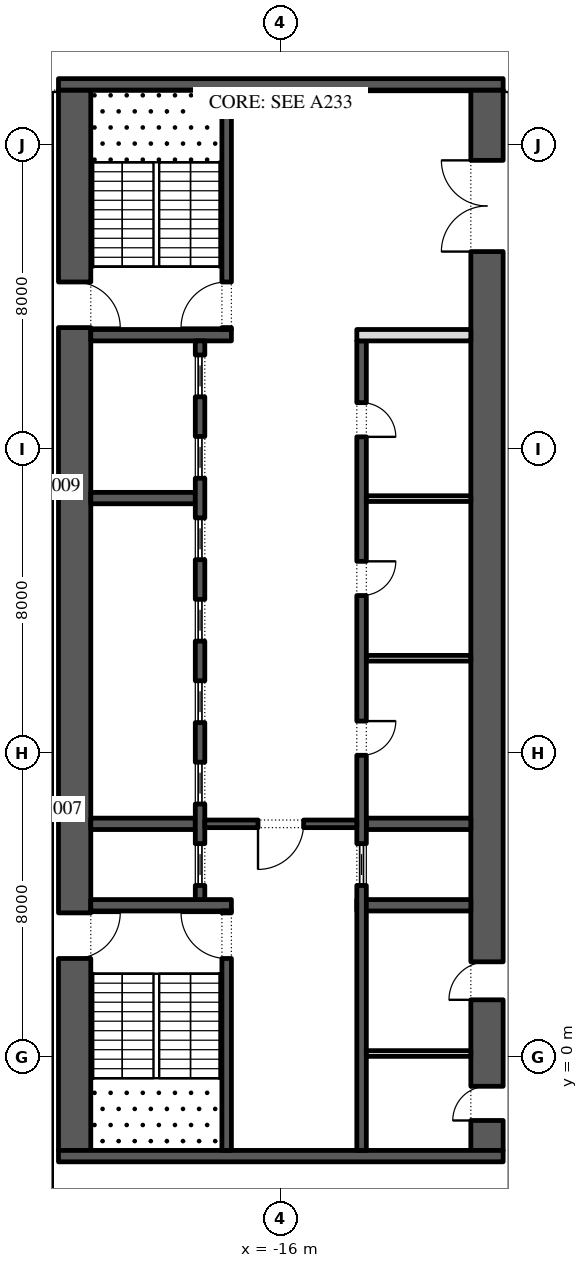
"""IFC4 building model, lengths in metres.
Left out: names, types, materials, properties, quantities, classifications, styles, units other than length and angle.
Written with IfcOpenShell. Run it as: python <this file> out.ifc"""

import sys

from ifc_helpers import new_model, si_unit, direction, frame, frame_2d, origin, place, context, subcontext, project, spatial, rectangle, extrude, element, fill, save


model = new_model("IFC4")
c1 = context("Model", 3, precision=1e-05, world=origin(), true_north=direction((0.0, 1.0)))
c2 = subcontext(c1, "Body", "Model", "MODEL_VIEW")
j1 = project(units=[si_unit("LENGTHUNIT", "METRE"), si_unit("PLANEANGLEUNIT", "RADIAN")], contexts=[c1])
p1 = place(None, origin())
s1 = spatial("IfcSite", under=j1, at=p1, CompositionType="ELEMENT")
p2 = place(p1, origin())
s2 = spatial("IfcBuilding", under=s1, at=p2, CompositionType="ELEMENT")
p3 = place(p2, frame((0.0, 0.0, 139.2)))
s3 = spatial("IfcBuildingStorey", under=s2, at=p3, CompositionType="ELEMENT", Elevation=139.2)
p4 = place(p3, frame((-21.425, -2.45, 0.0), z_axis=(0.0, 0.0, 1.0), x_axis=(0.0, 1.0, 0.0)))
e1 = element("IfcWall", 1, at=p4, inside=s3, PredefinedType="SHEAR", context=c2, shape_type="SweptSolid", body=[
    extrude(rectangle(XDim=27.9, YDim=0.85, at=frame_2d((13.95, 0.0))), origin(), (0.0, 0.0, 1.0), 4.0),
])
p5 = place(p4, frame((5.05, 0.0, 0.0)))
e2 = element("IfcOpeningElement", 2, at=p5, cuts=e1, PredefinedType="OPENING", context=c2, shape_type="SweptSolid", body=[
    extrude(rectangle(XDim=1.2, YDim=2.1, at=frame_2d((0.6, 1.05))), frame((0.0, 0.435, 0.0), z_axis=(0.0, -1.0, 0.0), x_axis=(1.0, 0.0, 0.0)), (0.0, 0.0, 1.0), 0.87),
])
p6 = place(p4, frame((21.65, 0.0, 0.0)))
e3 = element("IfcOpeningElement", 3, at=p6, cuts=e1, PredefinedType="OPENING", context=c2, shape_type="SweptSolid", body=[
    extrude(rectangle(XDim=1.2, YDim=2.1, at=frame_2d((0.6, 1.05))), frame((0.0, 0.435, 0.0), z_axis=(0.0, -1.0, 0.0), x_axis=(1.0, 0.0, 0.0)), (0.0, 0.0, 1.0), 0.87),
])
p7 = place(p3, frame((-10.575, -2.45, 0.0), z_axis=(0.0, 0.0, 1.0), x_axis=(0.0, 1.0, 0.0)))
e4 = element("IfcWall", 4, at=p7, inside=s3, PredefinedType="SHEAR", context=c2, shape_type="SweptSolid", body=[
    extrude(rectangle(XDim=27.9, YDim=0.85, at=frame_2d((13.95, 0.0))), origin(), (0.0, 0.0, 1.0), 4.0),
])
p8 = place(p7, frame((23.65, 0.0, 0.0)))
e5 = element("IfcOpeningElement", 5, at=p8, cuts=e4, PredefinedType="OPENING", context=c2, shape_type="SweptSolid", body=[
    extrude(rectangle(XDim=2.4, YDim=2.1, at=frame_2d((1.2, 1.05))), frame((0.0, 0.435, 0.0), z_axis=(0.0, -1.0, 0.0), x_axis=(1.0, 0.0, 0.0)), (0.0, 0.0, 1.0), 0.87),
])
p9 = place(p7, frame((0.788, 0.0, 0.0)))
e6 = element("IfcOpeningElement", 6, at=p9, cuts=e4, PredefinedType="OPENING", context=c2, shape_type="SweptSolid", body=[
    extrude(rectangle(XDim=0.9, YDim=2.1, at=frame_2d((0.45, 1.05))), frame((0.0, 0.435, 0.0), z_axis=(0.0, -1.0, 0.0), x_axis=(1.0, 0.0, 0.0)), (0.0, 0.0, 1.0), 0.87),
])
p10 = place(p7, frame((3.962, 0.0, 0.0)))
e7 = element("IfcOpeningElement", 7, at=p10, cuts=e4, PredefinedType="OPENING", context=c2, shape_type="SweptSolid", body=[
    extrude(rectangle(XDim=1.0, YDim=2.1, at=frame_2d((0.5, 1.05))), frame((0.0, 0.435, 0.0), z_axis=(0.0, -1.0, 0.0), x_axis=(1.0, 0.0, 0.0)), (0.0, 0.0, 1.0), 0.87),
])
for number, where, z_axis, x_axis in (
    (8, (-21.85, -2.6, 0.0), (0.0, 0.0, 1.0), (1.0, 0.0, 0.0)),
    (9, (-21.85, 25.6, 0.0), (0.0, 0.0, 1.0), (1.0, 0.0, 0.0)),
):
    element("IfcWall", number, at=place(p3, frame(where, z_axis=z_axis, x_axis=x_axis)), inside=s3, PredefinedType="SHEAR", context=c2, shape_type="SweptSolid", body=[
        extrude(rectangle(XDim=11.7, YDim=0.3, at=frame_2d((5.85, 0.0))), origin(), (0.0, 0.0, 1.0), 4.0),
    ])
p11 = place(p3, frame((-21.0, 4.0, 0.0), z_axis=(0.0, 0.0, 1.0), x_axis=(1.0, 0.0, 0.0)))
e10 = element("IfcWall", 10, at=p11, inside=s3, PredefinedType="SHEAR", context=c2, shape_type="SweptSolid", body=[
    extrude(rectangle(XDim=3.7, YDim=0.3, at=frame_2d((1.85, 0.0))), origin(), (0.0, 0.0, 1.0), 4.0),
])
p12 = place(p3, frame((-17.425, -2.45, 0.0), z_axis=(0.0, 0.0, 1.0), x_axis=(0.0, 1.0, 0.0)))
e11 = element("IfcWall", 11, at=p12, inside=s3, PredefinedType="SHEAR", context=c2, shape_type="SweptSolid", body=[
    extrude(rectangle(XDim=6.3, YDim=0.25, at=frame_2d((3.15, 0.0))), origin(), (0.0, 0.0, 1.0), 4.0),
])
p13 = place(p12, frame((5.05, 0.0, 0.0)))
e12 = element("IfcOpeningElement", 12, at=p13, cuts=e11, PredefinedType="OPENING", context=c2, shape_type="SweptSolid", body=[
    extrude(rectangle(XDim=1.2, YDim=2.1, at=frame_2d((0.6, 1.05))), frame((0.0, 0.135, 0.0), z_axis=(0.0, -1.0, 0.0), x_axis=(1.0, 0.0, 0.0)), (0.0, 0.0, 1.0), 0.27),
])
p14 = place(p3, frame((-21.0, 19.0, 0.0), z_axis=(0.0, 0.0, 1.0), x_axis=(1.0, 0.0, 0.0)))
e13 = element("IfcWall", 13, at=p14, inside=s3, PredefinedType="SHEAR", context=c2, shape_type="SweptSolid", body=[
    extrude(rectangle(XDim=3.7, YDim=0.3, at=frame_2d((1.85, 0.0))), origin(), (0.0, 0.0, 1.0), 4.0),
])
p15 = place(p3, frame((-17.425, 19.15, 0.0), z_axis=(0.0, 0.0, 1.0), x_axis=(0.0, 1.0, 0.0)))
e14 = element("IfcWall", 14, at=p15, inside=s3, PredefinedType="SHEAR", context=c2, shape_type="SweptSolid", body=[
    extrude(rectangle(XDim=6.3, YDim=0.25, at=frame_2d((3.15, 0.0))), origin(), (0.0, 0.0, 1.0), 4.0),
])
p16 = place(p15, frame((0.05, 0.0, 0.0)))
e15 = element("IfcOpeningElement", 15, at=p16, cuts=e14, PredefinedType="OPENING", context=c2, shape_type="SweptSolid", body=[
    extrude(rectangle(XDim=1.2, YDim=2.1, at=frame_2d((0.6, 1.05))), frame((0.0, 0.135, 0.0), z_axis=(0.0, -1.0, 0.0), x_axis=(1.0, 0.0, 0.0)), (0.0, 0.0, 1.0), 0.27),
])
for number, where, z_axis, x_axis in (
    (16, (-21.0, 6.143, 0.0), (0.0, 0.0, 1.0), (1.0, 0.0, 0.0)),
    (17, (-21.0, 14.714, 0.0), (0.0, 0.0, 1.0), (1.0, 0.0, 0.0)),
):
    element("IfcWall", number, at=place(p3, frame(where, z_axis=z_axis, x_axis=x_axis)), inside=s3, PredefinedType="SHEAR", context=c2, shape_type="SweptSolid", body=[
        extrude(rectangle(XDim=2.75, YDim=0.3, at=frame_2d((1.375, 0.0))), origin(), (0.0, 0.0, 1.0), 4.0),
    ])
p17 = place(p3, frame((-18.125, 4.15, 0.0), z_axis=(0.0, 0.0, 1.0), x_axis=(0.0, 1.0, 0.0)))
e18 = element("IfcWall", 18, at=p17, inside=s3, PredefinedType="SHEAR", context=c2, shape_type="SweptSolid", body=[
    extrude(rectangle(XDim=14.7, YDim=0.25, at=frame_2d((7.35, 0.0))), origin(), (0.0, 0.0, 1.0), 4.0),
])
p18 = place(p17, frame((0.371, 0.0, 0.0)))
e19 = element("IfcOpeningElement", 19, at=p18, cuts=e18, PredefinedType="OPENING", context=c2, shape_type="SweptSolid", body=[
    extrude(rectangle(XDim=1.1, YDim=2.1, at=frame_2d((0.55, 1.05))), frame((0.0, 0.135, 0.0), z_axis=(0.0, -1.0, 0.0), x_axis=(1.0, 0.0, 0.0)), (0.0, 0.0, 1.0), 0.27),
])
p19 = place(p17, frame((2.514, 0.0, 0.0)))
e20 = element("IfcOpeningElement", 20, at=p19, cuts=e18, PredefinedType="OPENING", context=c2, shape_type="SweptSolid", body=[
    extrude(rectangle(XDim=1.1, YDim=2.1, at=frame_2d((0.55, 1.05))), frame((0.0, 0.135, 0.0), z_axis=(0.0, -1.0, 0.0), x_axis=(1.0, 0.0, 0.0)), (0.0, 0.0, 1.0), 0.27),
])
p20 = place(p17, frame((4.657, 0.0, 0.0)))
e21 = element("IfcOpeningElement", 21, at=p20, cuts=e18, PredefinedType="OPENING", context=c2, shape_type="SweptSolid", body=[
    extrude(rectangle(XDim=1.1, YDim=2.1, at=frame_2d((0.55, 1.05))), frame((0.0, 0.135, 0.0), z_axis=(0.0, -1.0, 0.0), x_axis=(1.0, 0.0, 0.0)), (0.0, 0.0, 1.0), 0.27),
])
p21 = place(p17, frame((6.8, 0.0, 0.0)))
e22 = element("IfcOpeningElement", 22, at=p21, cuts=e18, PredefinedType="OPENING", context=c2, shape_type="SweptSolid", body=[
    extrude(rectangle(XDim=1.1, YDim=2.1, at=frame_2d((0.55, 1.05))), frame((0.0, 0.135, 0.0), z_axis=(0.0, -1.0, 0.0), x_axis=(1.0, 0.0, 0.0)), (0.0, 0.0, 1.0), 0.27),
])
p22 = place(p17, frame((8.943, 0.0, 0.0)))
e23 = element("IfcOpeningElement", 23, at=p22, cuts=e18, PredefinedType="OPENING", context=c2, shape_type="SweptSolid", body=[
    extrude(rectangle(XDim=1.1, YDim=2.1, at=frame_2d((0.55, 1.05))), frame((0.0, 0.135, 0.0), z_axis=(0.0, -1.0, 0.0), x_axis=(1.0, 0.0, 0.0)), (0.0, 0.0, 1.0), 0.27),
])
p23 = place(p17, frame((11.086, 0.0, 0.0)))
e24 = element("IfcOpeningElement", 24, at=p23, cuts=e18, PredefinedType="OPENING", context=c2, shape_type="SweptSolid", body=[
    extrude(rectangle(XDim=1.1, YDim=2.1, at=frame_2d((0.55, 1.05))), frame((0.0, 0.135, 0.0), z_axis=(0.0, -1.0, 0.0), x_axis=(1.0, 0.0, 0.0)), (0.0, 0.0, 1.0), 0.27),
])
p24 = place(p17, frame((13.229, 0.0, 0.0)))
e25 = element("IfcOpeningElement", 25, at=p24, cuts=e18, PredefinedType="OPENING", context=c2, shape_type="SweptSolid", body=[
    extrude(rectangle(XDim=1.1, YDim=2.1, at=frame_2d((0.55, 1.05))), frame((0.0, 0.135, 0.0), z_axis=(0.0, -1.0, 0.0), x_axis=(1.0, 0.0, 0.0)), (0.0, 0.0, 1.0), 0.27),
])
p25 = place(p3, frame((-14.0, 4.0, 0.0), z_axis=(0.0, 0.0, 1.0), x_axis=(1.0, 0.0, 0.0)))
e26 = element("IfcWall", 26, at=p25, inside=s3, PredefinedType="SHEAR", context=c2, shape_type="SweptSolid", body=[
    extrude(rectangle(XDim=3.0, YDim=0.3, at=frame_2d((1.5, 0.0))), origin(), (0.0, 0.0, 1.0), 4.0),
])
p26 = place(p3, frame((-13.75, 6.143, 0.0), z_axis=(0.0, 0.0, 1.0), x_axis=(1.0, 0.0, 0.0)))
e27 = element("IfcWall", 27, at=p26, inside=s3, PredefinedType="SHEAR", context=c2, shape_type="SweptSolid", body=[
    extrude(rectangle(XDim=2.75, YDim=0.3, at=frame_2d((1.375, 0.0))), origin(), (0.0, 0.0, 1.0), 4.0),
])
p27 = place(p3, frame((-13.875, -2.45, 0.0), z_axis=(0.0, 0.0, 1.0), x_axis=(0.0, 1.0, 0.0)))
e28 = element("IfcWall", 28, at=p27, inside=s3, PredefinedType="SHEAR", context=c2, shape_type="SweptSolid", body=[
    extrude(rectangle(XDim=21.3, YDim=0.25, at=frame_2d((10.65, 0.0))), origin(), (0.0, 0.0, 1.0), 4.0),
])
p28 = place(p27, frame((10.396, 0.0, 0.0)))
e29 = element("IfcOpeningElement", 29, at=p28, cuts=e28, PredefinedType="OPENING", context=c2, shape_type="SweptSolid", body=[
    extrude(rectangle(XDim=0.9, YDim=2.1, at=frame_2d((0.45, 1.05))), frame((0.0, 0.135, 0.0), z_axis=(0.0, -1.0, 0.0), x_axis=(1.0, 0.0, 0.0)), (0.0, 0.0, 1.0), 0.27),
])
p29 = place(p27, frame((14.6, 0.0, 0.0)))
e30 = element("IfcOpeningElement", 30, at=p29, cuts=e28, PredefinedType="OPENING", context=c2, shape_type="SweptSolid", body=[
    extrude(rectangle(XDim=0.9, YDim=2.1, at=frame_2d((0.45, 1.05))), frame((0.0, 0.135, 0.0), z_axis=(0.0, -1.0, 0.0), x_axis=(1.0, 0.0, 0.0)), (0.0, 0.0, 1.0), 0.27),
])
p30 = place(p27, frame((18.775, 0.0, 0.0)))
e31 = element("IfcOpeningElement", 31, at=p30, cuts=e28, PredefinedType="OPENING", context=c2, shape_type="SweptSolid", body=[
    extrude(rectangle(XDim=0.9, YDim=2.1, at=frame_2d((0.45, 1.05))), frame((0.0, 0.135, 0.0), z_axis=(0.0, -1.0, 0.0), x_axis=(1.0, 0.0, 0.0)), (0.0, 0.0, 1.0), 0.27),
])
p31 = place(p27, frame((6.971, 0.0, 0.0)))
e32 = element("IfcOpeningElement", 32, at=p31, cuts=e28, PredefinedType="OPENING", context=c2, shape_type="SweptSolid", body=[
    extrude(rectangle(XDim=1.1, YDim=2.1, at=frame_2d((0.55, 1.05))), frame((0.0, 0.135, 0.0), z_axis=(0.0, -1.0, 0.0), x_axis=(1.0, 0.0, 0.0)), (0.0, 0.0, 1.0), 0.27),
])
p32 = place(p3, frame((-14.0, 19.0, 0.0), z_axis=(0.0, 0.0, 1.0), x_axis=(1.0, 0.0, 0.0)))
e33 = element("IfcWall", 33, at=p32, inside=s3, PredefinedType="PARTITIONING", context=c2, shape_type="SweptSolid", body=[
    extrude(rectangle(XDim=3.0, YDim=0.3, at=frame_2d((1.5, 0.0))), origin(), (0.0, 0.0, 1.0), 4.0),
])
for number, where, z_axis, x_axis in (
    (34, (-13.75, 10.5, 0.0), (0.0, 0.0, 1.0), (1.0, 0.0, 0.0)),
    (35, (-13.75, 14.7, 0.0), (0.0, 0.0, 1.0), (1.0, 0.0, 0.0)),
):
    element("IfcWall", number, at=place(p3, frame(where, z_axis=z_axis, x_axis=x_axis)), inside=s3, PredefinedType="PARTITIONING", context=c2, shape_type="SweptSolid", body=[
        extrude(rectangle(XDim=2.75, YDim=0.15, at=frame_2d((1.375, 0.0))), origin(), (0.0, 0.0, 1.0), 4.0),
    ])
p33 = place(p3, frame((-18.0, 6.143, 0.0), z_axis=(0.0, 0.0, 1.0), x_axis=(1.0, 0.0, 0.0)))
e36 = element("IfcWall", 36, at=p33, inside=s3, PredefinedType="SHEAR", context=c2, shape_type="SweptSolid", body=[
    extrude(rectangle(XDim=4.0, YDim=0.2, at=frame_2d((2.0, 0.0))), origin(), (0.0, 0.0, 1.0), 4.0),
])
p34 = place(p33, frame((1.4, 0.0, 0.0)))
e37 = element("IfcOpeningElement", 37, at=p34, cuts=e36, PredefinedType="OPENING", context=c2, shape_type="SweptSolid", body=[
    extrude(rectangle(XDim=1.2, YDim=2.1, at=frame_2d((0.6, 1.05))), frame((0.0, 0.11, 0.0), z_axis=(0.0, -1.0, 0.0), x_axis=(1.0, 0.0, 0.0)), (0.0, 0.0, 1.0), 0.22),
])
p35 = place(p3, frame((-13.75, 0.1, 0.0), z_axis=(0.0, 0.0, 1.0), x_axis=(1.0, 0.0, 0.0)))
e38 = element("IfcWall", 38, at=p35, inside=s3, PredefinedType="PARTITIONING", context=c2, shape_type="SweptSolid", body=[
    extrude(rectangle(XDim=2.75, YDim=0.15, at=frame_2d((1.375, 0.0))), origin(), (0.0, 0.0, 1.0), 4.0),
])
p36 = place(p18, origin())
e39 = element("IfcDoor", 39, at=p36, inside=s3, OperationType="SLIDING_TO_LEFT", PredefinedType="DOOR", context=c2, shape_type="SweptSolid", body=[
    extrude(rectangle(XDim=1.1, YDim=2.1, at=frame_2d((0.55, 1.05))), frame((0.0, 0.025, 0.0), z_axis=(0.0, -1.0, 0.0), x_axis=(1.0, 0.0, 0.0)), (0.0, 0.0, 1.0), 0.05),
])
fill(e19, e39)
p37 = place(p19, origin())
e40 = element("IfcDoor", 40, at=p37, inside=s3, OperationType="SLIDING_TO_LEFT", PredefinedType="DOOR", context=c2, shape_type="SweptSolid", body=[
    extrude(rectangle(XDim=1.1, YDim=2.1, at=frame_2d((0.55, 1.05))), frame((0.0, 0.025, 0.0), z_axis=(0.0, -1.0, 0.0), x_axis=(1.0, 0.0, 0.0)), (0.0, 0.0, 1.0), 0.05),
])
fill(e20, e40)
p38 = place(p20, origin())
e41 = element("IfcDoor", 41, at=p38, inside=s3, OperationType="SLIDING_TO_LEFT", PredefinedType="DOOR", context=c2, shape_type="SweptSolid", body=[
    extrude(rectangle(XDim=1.1, YDim=2.1, at=frame_2d((0.55, 1.05))), frame((0.0, 0.025, 0.0), z_axis=(0.0, -1.0, 0.0), x_axis=(1.0, 0.0, 0.0)), (0.0, 0.0, 1.0), 0.05),
])
fill(e21, e41)
p39 = place(p21, origin())
e42 = element("IfcDoor", 42, at=p39, inside=s3, OperationType="SLIDING_TO_LEFT", PredefinedType="DOOR", context=c2, shape_type="SweptSolid", body=[
    extrude(rectangle(XDim=1.1, YDim=2.1, at=frame_2d((0.55, 1.05))), frame((0.0, 0.025, 0.0), z_axis=(0.0, -1.0, 0.0), x_axis=(1.0, 0.0, 0.0)), (0.0, 0.0, 1.0), 0.05),
])
fill(e22, e42)
p40 = place(p22, origin())
e43 = element("IfcDoor", 43, at=p40, inside=s3, OperationType="SLIDING_TO_LEFT", PredefinedType="DOOR", context=c2, shape_type="SweptSolid", body=[
    extrude(rectangle(XDim=1.1, YDim=2.1, at=frame_2d((0.55, 1.05))), frame((0.0, 0.025, 0.0), z_axis=(0.0, -1.0, 0.0), x_axis=(1.0, 0.0, 0.0)), (0.0, 0.0, 1.0), 0.05),
])
fill(e23, e43)
p41 = place(p23, origin())
e44 = element("IfcDoor", 44, at=p41, inside=s3, OperationType="SLIDING_TO_LEFT", PredefinedType="DOOR", context=c2, shape_type="SweptSolid", body=[
    extrude(rectangle(XDim=1.1, YDim=2.1, at=frame_2d((0.55, 1.05))), frame((0.0, 0.025, 0.0), z_axis=(0.0, -1.0, 0.0), x_axis=(1.0, 0.0, 0.0)), (0.0, 0.0, 1.0), 0.05),
])
fill(e24, e44)
p42 = place(p24, origin())
e45 = element("IfcDoor", 45, at=p42, inside=s3, OperationType="SLIDING_TO_LEFT", PredefinedType="DOOR", context=c2, shape_type="SweptSolid", body=[
    extrude(rectangle(XDim=1.1, YDim=2.1, at=frame_2d((0.55, 1.05))), frame((0.0, 0.025, 0.0), z_axis=(0.0, -1.0, 0.0), x_axis=(1.0, 0.0, 0.0)), (0.0, 0.0, 1.0), 0.05),
])
fill(e25, e45)
p43 = place(p28, frame((0.9, -0.2, 0.0), z_axis=(0.0, 0.0, 1.0), x_axis=(-1.0, 0.0, 0.0)))
e46 = element("IfcDoor", 46, at=p43, inside=s3, OperationType="SINGLE_SWING_RIGHT", PredefinedType="DOOR", context=c2, shape_type="SweptSolid", body=[
    extrude(rectangle(XDim=0.9, YDim=2.1, at=frame_2d((0.45, 1.05))), frame((0.0, -0.075, 0.0), z_axis=(0.0, -1.0, 0.0), x_axis=(1.0, 0.0, 0.0)), (0.0, 0.0, 1.0), 0.05),
])
fill(e29, e46)
p44 = place(p29, frame((0.9, -0.2, 0.0), z_axis=(0.0, 0.0, 1.0), x_axis=(-1.0, 0.0, 0.0)))
e47 = element("IfcDoor", 47, at=p44, inside=s3, OperationType="SINGLE_SWING_RIGHT", PredefinedType="DOOR", context=c2, shape_type="SweptSolid", body=[
    extrude(rectangle(XDim=0.9, YDim=2.1, at=frame_2d((0.45, 1.05))), frame((0.0, -0.075, 0.0), z_axis=(0.0, -1.0, 0.0), x_axis=(1.0, 0.0, 0.0)), (0.0, 0.0, 1.0), 0.05),
])
fill(e30, e47)
p45 = place(p30, frame((0.9, -0.2, 0.0), z_axis=(0.0, 0.0, 1.0), x_axis=(-1.0, 0.0, 0.0)))
e48 = element("IfcDoor", 48, at=p45, inside=s3, OperationType="SINGLE_SWING_LEFT", PredefinedType="DOOR", context=c2, shape_type="SweptSolid", body=[
    extrude(rectangle(XDim=0.9, YDim=2.1, at=frame_2d((0.45, 1.05))), frame((0.0, -0.075, 0.0), z_axis=(0.0, -1.0, 0.0), x_axis=(1.0, 0.0, 0.0)), (0.0, 0.0, 1.0), 0.05),
])
fill(e31, e48)
p46 = place(p31, origin())
e49 = element("IfcDoor", 49, at=p46, inside=s3, OperationType="SLIDING_TO_LEFT", PredefinedType="DOOR", context=c2, shape_type="SweptSolid", body=[
    extrude(rectangle(XDim=1.1, YDim=2.1, at=frame_2d((0.55, 1.05))), frame((0.0, 0.025, 0.0), z_axis=(0.0, -1.0, 0.0), x_axis=(1.0, 0.0, 0.0)), (0.0, 0.0, 1.0), 0.05),
])
fill(e32, e49)
p47 = place(p34, frame((1.2, 0.0, 0.0), z_axis=(0.0, 0.0, 1.0), x_axis=(-1.0, 0.0, 0.0)))
e50 = element("IfcDoor", 50, at=p47, inside=s3, OperationType="SINGLE_SWING_LEFT", PredefinedType="DOOR", context=c2, shape_type="SweptSolid", body=[
    extrude(rectangle(XDim=1.2, YDim=2.1, at=frame_2d((0.6, 1.05))), frame((0.0, 0.025, 0.0), z_axis=(0.0, -1.0, 0.0), x_axis=(1.0, 0.0, 0.0)), (0.0, 0.0, 1.0), 0.05),
])
fill(e37, e50)
p48 = place(p8, origin())
e51 = element("IfcDoor", 51, at=p48, inside=s3, OperationType="DOUBLE_DOOR_SINGLE_SWING", PredefinedType="DOOR", context=c2, shape_type="SweptSolid", body=[
    extrude(rectangle(XDim=2.4, YDim=2.1, at=frame_2d((1.2, 1.05))), frame((0.0, 0.025, 0.0), z_axis=(0.0, -1.0, 0.0), x_axis=(1.0, 0.0, 0.0)), (0.0, 0.0, 1.0), 0.05),
])
fill(e5, e51)
p49 = place(p13, origin())
e52 = element("IfcDoor", 52, at=p49, inside=s3, OperationType="SINGLE_SWING_LEFT", PredefinedType="DOOR", context=c2, shape_type="SweptSolid", body=[
    extrude(rectangle(XDim=1.2, YDim=2.1, at=frame_2d((0.6, 1.05))), frame((0.0, 0.025, 0.0), z_axis=(0.0, -1.0, 0.0), x_axis=(1.0, 0.0, 0.0)), (0.0, 0.0, 1.0), 0.05),
])
fill(e12, e52)
p50 = place(p5, frame((1.2, 0.0, 0.0), z_axis=(0.0, 0.0, 1.0), x_axis=(-1.0, 0.0, 0.0)))
e53 = element("IfcDoor", 53, at=p50, inside=s3, OperationType="SINGLE_SWING_RIGHT", PredefinedType="DOOR", context=c2, shape_type="SweptSolid", body=[
    extrude(rectangle(XDim=1.2, YDim=2.1, at=frame_2d((0.6, 1.05))), frame((0.0, 0.025, 0.0), z_axis=(0.0, -1.0, 0.0), x_axis=(1.0, 0.0, 0.0)), (0.0, 0.0, 1.0), 0.05),
])
fill(e2, e53)
p51 = place(p16, origin())
e54 = element("IfcDoor", 54, at=p51, inside=s3, OperationType="SINGLE_SWING_RIGHT", PredefinedType="DOOR", context=c2, shape_type="SweptSolid", body=[
    extrude(rectangle(XDim=1.2, YDim=2.1, at=frame_2d((0.6, 1.05))), frame((0.0, 0.025, 0.0), z_axis=(0.0, -1.0, 0.0), x_axis=(1.0, 0.0, 0.0)), (0.0, 0.0, 1.0), 0.05),
])
fill(e15, e54)
p52 = place(p6, frame((1.2, 0.0, 0.0), z_axis=(0.0, 0.0, 1.0), x_axis=(-1.0, 0.0, 0.0)))
e55 = element("IfcDoor", 55, at=p52, inside=s3, OperationType="SINGLE_SWING_LEFT", PredefinedType="DOOR", context=c2, shape_type="SweptSolid", body=[
    extrude(rectangle(XDim=1.2, YDim=2.1, at=frame_2d((0.6, 1.05))), frame((0.0, 0.025, 0.0), z_axis=(0.0, -1.0, 0.0), x_axis=(1.0, 0.0, 0.0)), (0.0, 0.0, 1.0), 0.05),
])
fill(e3, e55)
p53 = place(p9, origin())
e56 = element("IfcDoor", 56, at=p53, inside=s3, OperationType="SINGLE_SWING_RIGHT", PredefinedType="DOOR", context=c2, shape_type="SweptSolid", body=[
    extrude(rectangle(XDim=0.9, YDim=2.1, at=frame_2d((0.45, 1.05))), frame((0.0, 0.425, 0.0), z_axis=(0.0, -1.0, 0.0), x_axis=(1.0, 0.0, 0.0)), (0.0, 0.0, 1.0), 0.05),
])
fill(e6, e56)
p54 = place(p10, origin())
e57 = element("IfcDoor", 57, at=p54, inside=s3, OperationType="SINGLE_SWING_RIGHT", PredefinedType="DOOR", context=c2, shape_type="SweptSolid", body=[
    extrude(rectangle(XDim=1.0, YDim=2.1, at=frame_2d((0.5, 1.05))), frame((0.0, 0.425, 0.0), z_axis=(0.0, -1.0, 0.0), x_axis=(1.0, 0.0, 0.0)), (0.0, 0.0, 1.0), 0.05),
])
fill(e7, e57)
save(model, sys.argv[1])
